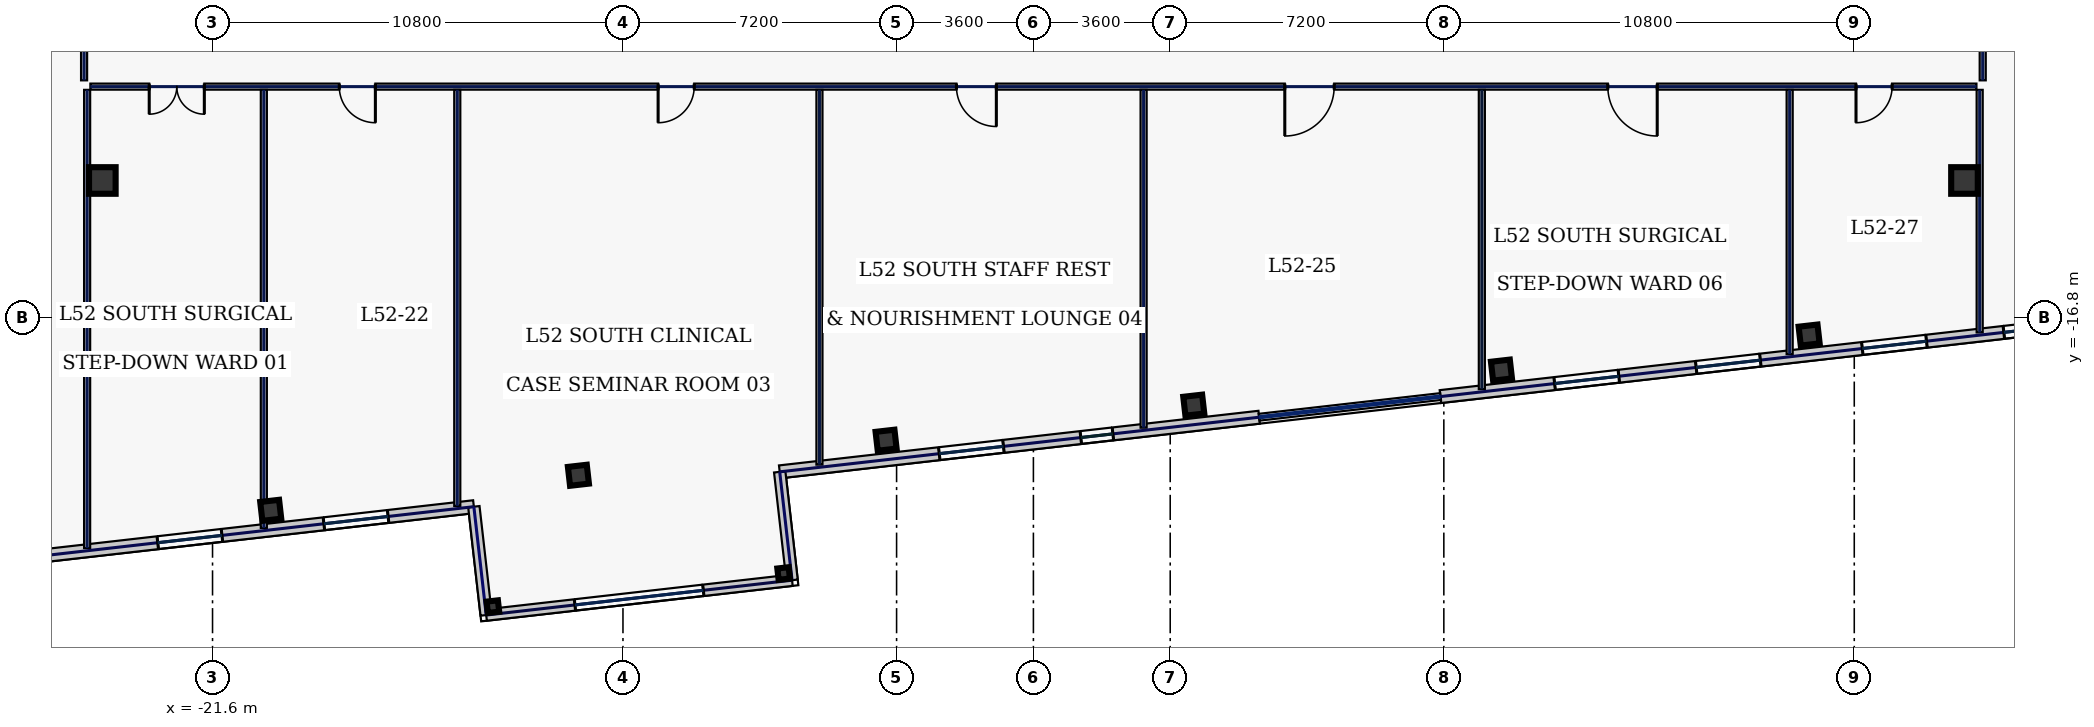
"""IFC4 building model, lengths in metres.
Left out: names, types, materials, properties, quantities, classifications, styles, units other than length and angle.
Written with IfcOpenShell. Run it as: python <this file> out.ifc"""

import sys

from ifc_helpers import new_model, si_unit, direction, frame, frame_2d, origin, origin_2d, place, context, subcontext, project, spatial, rectangle, hollow_rectangle, extrude, element, fill, save


model = new_model("IFC4")
c1 = context("Model", 3, precision=1e-05, world=origin(), true_north=direction((0.0, 1.0)))
c2 = subcontext(c1, "Body", "Model", "MODEL_VIEW")
j1 = project(units=[si_unit("LENGTHUNIT", "METRE"), si_unit("PLANEANGLEUNIT", "RADIAN")], contexts=[c1])
p1 = place(None, origin())
s1 = spatial("IfcSite", under=j1, at=p1, CompositionType="ELEMENT")
p2 = place(p1, origin())
s2 = spatial("IfcBuilding", under=s1, at=p2, CompositionType="ELEMENT")
p3 = place(p2, frame((0.0, 0.0, 226.2)))
s3 = spatial("IfcBuildingStorey", under=s2, at=p3, CompositionType="ELEMENT", Elevation=226.2)
for number, where, z_axis, x_axis in (
    (1, (-24.5, -13.2, 0.0), (0.0, 0.0, 1.0), (1.0, 0.0, 0.0)),
    (2, (24.5, -13.2, 0.0), (0.0, 0.0, 1.0), (1.0, 0.0, 0.0)),
):
    element("IfcColumn", number, at=place(p3, frame(where, z_axis=z_axis, x_axis=x_axis)), inside=s3, PredefinedType="COLUMN", context=c2, shape_type="SweptSolid", body=[
        extrude(hollow_rectangle(XDim=0.7, YDim=0.7, WallThickness=0.032, at=origin_2d()), origin(), (0.0, 0.0, 1.0), 3.74),
    ])
for number, where, z_axis, x_axis in (
    (3, (-20.069, -21.88, 0.0), (0.0, 0.0, 1.0), (0.994, 0.113, 0.0)),
    (4, (-11.972, -20.958, 0.0), (0.0, 0.0, 1.0), (0.994, 0.113, 0.0)),
    (5, (-3.876, -20.035, 0.0), (0.0, 0.0, 1.0), (0.994, 0.113, 0.0)),
    (6, (4.22, -19.113, 0.0), (0.0, 0.0, 1.0), (0.994, 0.113, 0.0)),
    (7, (12.316, -18.19, 0.0), (0.0, 0.0, 1.0), (0.994, 0.113, 0.0)),
    (8, (20.412, -17.268, 0.0), (0.0, 0.0, 1.0), (0.994, 0.113, 0.0)),
):
    element("IfcColumn", number, at=place(p3, frame(where, z_axis=z_axis, x_axis=x_axis)), inside=s3, PredefinedType="COLUMN", context=c2, shape_type="SweptSolid", body=[
        extrude(hollow_rectangle(XDim=0.5, YDim=0.5, WallThickness=0.025, at=origin_2d()), origin(), (0.0, 0.0, 1.0), 3.74),
    ])
for number, where, z_axis, x_axis in (
    (9, (-14.223, -24.415, 0.0), (0.0, 0.0, 1.0), (0.994, 0.113, 0.0)),
    (10, (-6.572, -23.543, 0.0), (0.0, 0.0, 1.0), (0.994, 0.113, 0.0)),
):
    element("IfcColumn", number, at=place(p3, frame(where, z_axis=z_axis, x_axis=x_axis)), inside=s3, PredefinedType="COLUMN", context=c2, shape_type="SweptSolid", body=[
        extrude(hollow_rectangle(XDim=0.3, YDim=0.3, WallThickness=0.016, at=origin_2d()), origin(), (0.0, 0.0, 1.0), 3.74),
    ])
p4 = place(p3, frame((-28.783, -23.386, 0.0), z_axis=(0.0, 0.0, 1.0), x_axis=(0.993572262951, 0.113199639106, 0.0)))
e11 = element("IfcWall", 11, at=p4, inside=s3, PredefinedType="STANDARD", context=c2, shape_type="SweptSolid", body=[
    extrude(rectangle(XDim=14.15, YDim=0.34, at=frame_2d((7.075, 0.0))), origin(), (0.0, 0.0, 1.0), 3.74),
])
p5 = place(p4, frame((2.03, 0.0, 0.88)))
e12 = element("IfcOpeningElement", 12, at=p5, cuts=e11, PredefinedType="OPENING", context=c2, shape_type="SweptSolid", body=[
    extrude(rectangle(XDim=0.85, YDim=1.85, at=frame_2d((0.425, 0.925))), frame((0.0, 0.18, 0.0), z_axis=(0.0, -1.0, 0.0), x_axis=(1.0, 0.0, 0.0)), (0.0, 0.0, 1.0), 0.36),
])
p6 = place(p4, frame((5.779, 0.0, 0.88)))
e13 = element("IfcOpeningElement", 13, at=p6, cuts=e11, PredefinedType="OPENING", context=c2, shape_type="SweptSolid", body=[
    extrude(rectangle(XDim=1.7, YDim=1.95, at=frame_2d((0.85, 0.975))), frame((0.0, 0.18, 0.0), z_axis=(0.0, -1.0, 0.0), x_axis=(1.0, 0.0, 0.0)), (0.0, 0.0, 1.0), 0.36),
])
p7 = place(p4, frame((10.179, 0.0, 0.88)))
e14 = element("IfcOpeningElement", 14, at=p7, cuts=e11, PredefinedType="OPENING", context=c2, shape_type="SweptSolid", body=[
    extrude(rectangle(XDim=1.7, YDim=1.95, at=frame_2d((0.85, 0.975))), frame((0.0, 0.18, 0.0), z_axis=(0.0, -1.0, 0.0), x_axis=(1.0, 0.0, 0.0)), (0.0, 0.0, 1.0), 0.36),
])
p8 = place(p3, frame((-6.676, -20.867, 0.0), z_axis=(0.0, 0.0, 1.0), x_axis=(0.993572024997, 0.113201727649, 0.0)))
e15 = element("IfcWall", 15, at=p8, inside=s3, PredefinedType="STANDARD", context=c2, shape_type="SweptSolid", body=[
    extrude(rectangle(XDim=12.698, YDim=0.34, at=frame_2d((6.349, 0.0))), origin(), (0.0, 0.0, 1.0), 3.74),
])
p9 = place(p8, frame((4.226, 0.0, 0.88)))
e16 = element("IfcOpeningElement", 16, at=p9, cuts=e15, PredefinedType="OPENING", context=c2, shape_type="SweptSolid", body=[
    extrude(rectangle(XDim=1.7, YDim=1.95, at=frame_2d((0.85, 0.975))), frame((0.0, 0.18, 0.0), z_axis=(0.0, -1.0, 0.0), x_axis=(1.0, 0.0, 0.0)), (0.0, 0.0, 1.0), 0.36),
])
p10 = place(p8, frame((7.974, 0.0, 0.88)))
e17 = element("IfcOpeningElement", 17, at=p10, cuts=e15, PredefinedType="OPENING", context=c2, shape_type="SweptSolid", body=[
    extrude(rectangle(XDim=0.85, YDim=1.85, at=frame_2d((0.425, 0.925))), frame((0.0, 0.18, 0.0), z_axis=(0.0, -1.0, 0.0), x_axis=(1.0, 0.0, 0.0)), (0.0, 0.0, 1.0), 0.36),
])
p11 = place(p3, frame((10.71, -18.886, 0.0), z_axis=(0.0, 0.0, 1.0), x_axis=(0.993572271362, 0.113199565282, 0.0)))
e18 = element("IfcWall", 18, at=p11, inside=s3, PredefinedType="STANDARD", context=c2, shape_type="SweptSolid", body=[
    extrude(rectangle(XDim=18.651, YDim=0.34, at=frame_2d((9.326, 0.0))), origin(), (0.0, 0.0, 1.0), 3.74),
])
p12 = place(p11, frame((3.024, 0.0, 0.88)))
e19 = element("IfcOpeningElement", 19, at=p12, cuts=e18, PredefinedType="OPENING", context=c2, shape_type="SweptSolid", body=[
    extrude(rectangle(XDim=1.7, YDim=1.95, at=frame_2d((0.85, 0.975))), frame((0.0, 0.18, 0.0), z_axis=(0.0, -1.0, 0.0), x_axis=(1.0, 0.0, 0.0)), (0.0, 0.0, 1.0), 0.36),
])
p13 = place(p11, frame((6.773, 0.0, 0.88)))
e20 = element("IfcOpeningElement", 20, at=p13, cuts=e18, PredefinedType="OPENING", context=c2, shape_type="SweptSolid", body=[
    extrude(rectangle(XDim=1.7, YDim=1.95, at=frame_2d((0.85, 0.975))), frame((0.0, 0.18, 0.0), z_axis=(0.0, -1.0, 0.0), x_axis=(1.0, 0.0, 0.0)), (0.0, 0.0, 1.0), 0.36),
])
p14 = place(p11, frame((11.173, 0.0, 0.88)))
e21 = element("IfcOpeningElement", 21, at=p14, cuts=e18, PredefinedType="OPENING", context=c2, shape_type="SweptSolid", body=[
    extrude(rectangle(XDim=1.7, YDim=1.95, at=frame_2d((0.85, 0.975))), frame((0.0, 0.18, 0.0), z_axis=(0.0, -1.0, 0.0), x_axis=(1.0, 0.0, 0.0)), (0.0, 0.0, 1.0), 0.36),
])
p15 = place(p11, frame((14.921, 0.0, 0.88)))
e22 = element("IfcOpeningElement", 22, at=p15, cuts=e18, PredefinedType="OPENING", context=c2, shape_type="SweptSolid", body=[
    extrude(rectangle(XDim=1.7, YDim=1.95, at=frame_2d((0.85, 0.975))), frame((0.0, 0.18, 0.0), z_axis=(0.0, -1.0, 0.0), x_axis=(1.0, 0.0, 0.0)), (0.0, 0.0, 1.0), 0.36),
])
p16 = place(p3, frame((-14.724, -21.784, 0.0), z_axis=(0.0, 0.0, 1.0), x_axis=(0.113222704107, -0.993569634839, 0.0)))
e23 = element("IfcWall", 23, at=p16, inside=s3, PredefinedType="STANDARD", context=c2, shape_type="SweptSolid", body=[
    extrude(rectangle(XDim=2.87, YDim=0.3, at=frame_2d((1.435, 0.0))), origin(), (0.0, 0.0, 1.0), 3.74),
])
p17 = place(p3, frame((-6.676, -20.867, 0.0), z_axis=(0.0, 0.0, 1.0), x_axis=(0.113138727493, -0.99357920084, 0.0)))
e24 = element("IfcWall", 24, at=p17, inside=s3, PredefinedType="STANDARD", context=c2, shape_type="SweptSolid", body=[
    extrude(rectangle(XDim=2.87, YDim=0.3, at=frame_2d((1.435, 0.0))), origin(), (0.0, 0.0, 1.0), 3.285),
])
p18 = place(p3, frame((-14.399, -24.636, 0.0), z_axis=(0.0, 0.0, 1.0), x_axis=(0.993571087422, 0.113209956448, 0.0)))
e25 = element("IfcWall", 25, at=p18, inside=s3, PredefinedType="STANDARD", context=c2, shape_type="SweptSolid", body=[
    extrude(rectangle(XDim=8.1, YDim=0.3, at=frame_2d((4.05, 0.0))), origin(), (0.0, 0.0, 1.0), 3.385),
])
p19 = place(p18, frame((2.35, 0.0, 0.68)))
e26 = element("IfcOpeningElement", 26, at=p19, cuts=e25, PredefinedType="OPENING", context=c2, shape_type="SweptSolid", body=[
    extrude(rectangle(XDim=3.4, YDim=2.35, at=frame_2d((1.7, 1.175))), frame((0.0, 0.16, 0.0), z_axis=(0.0, -1.0, 0.0), x_axis=(1.0, 0.0, 0.0)), (0.0, 0.0, 1.0), 0.32),
])
p20 = place(p3, frame((-24.98, -10.565, 0.0), z_axis=(0.0, 0.0, 1.0), x_axis=(0.0, 1.0, 0.0)))
e27 = element("IfcWall", 27, at=p20, inside=s3, PredefinedType="PARTITIONING", context=c2, shape_type="SweptSolid", body=[
    extrude(rectangle(XDim=2.98, YDim=0.16, at=frame_2d((1.49, 0.0))), origin(), (0.0, 0.0, 1.0), 3.74),
])
p21 = place(p20, frame((1.1, 0.0, 0.0)))
e28 = element("IfcOpeningElement", 28, at=p21, cuts=e27, PredefinedType="OPENING", context=c2, shape_type="SweptSolid", body=[
    extrude(rectangle(XDim=0.95, YDim=2.2, at=frame_2d((0.475, 1.1))), frame((0.0, 0.09, 0.0), z_axis=(0.0, -1.0, 0.0), x_axis=(1.0, 0.0, 0.0)), (0.0, 0.0, 1.0), 0.18),
])
p22 = place(p3, frame((24.98, -7.585, 0.0), z_axis=(0.0, 0.0, 1.0), x_axis=(0.0, -1.0, 0.0)))
e29 = element("IfcWall", 29, at=p22, inside=s3, PredefinedType="PARTITIONING", context=c2, shape_type="SweptSolid", body=[
    extrude(rectangle(XDim=2.98, YDim=0.16, at=frame_2d((1.49, 0.0))), origin(), (0.0, 0.0, 1.0), 3.74),
])
p23 = place(p22, frame((1.1, 0.0, 0.0)))
e30 = element("IfcOpeningElement", 30, at=p23, cuts=e29, PredefinedType="OPENING", context=c2, shape_type="SweptSolid", body=[
    extrude(rectangle(XDim=0.95, YDim=2.2, at=frame_2d((0.475, 1.1))), frame((0.0, 0.09, 0.0), z_axis=(0.0, -1.0, 0.0), x_axis=(1.0, 0.0, 0.0)), (0.0, 0.0, 1.0), 0.18),
])
p24 = place(p3, frame((24.815, -10.73, 0.0), z_axis=(0.0, 0.0, 1.0), x_axis=(-1.0, 0.0, 0.0)))
e31 = element("IfcWall", 31, at=p24, inside=s3, PredefinedType="PARTITIONING", context=c2, shape_type="SweptSolid", body=[
    extrude(rectangle(XDim=49.63, YDim=0.16, at=frame_2d((24.815, 0.0))), origin(), (0.0, 0.0, 1.0), 3.74),
])
p25 = place(p24, frame((46.631, 0.0, 0.0)))
e32 = element("IfcOpeningElement", 32, at=p25, cuts=e31, PredefinedType="OPENING", context=c2, shape_type="SweptSolid", body=[
    extrude(rectangle(XDim=1.45, YDim=2.2, at=frame_2d((0.725, 1.1))), frame((0.0, 0.09, 0.0), z_axis=(0.0, -1.0, 0.0), x_axis=(1.0, 0.0, 0.0)), (0.0, 0.0, 1.0), 0.18),
])
p26 = place(p24, frame((42.13, 0.0, 0.0)))
e33 = element("IfcOpeningElement", 33, at=p26, cuts=e31, PredefinedType="OPENING", context=c2, shape_type="SweptSolid", body=[
    extrude(rectangle(XDim=0.95, YDim=2.2, at=frame_2d((0.475, 1.1))), frame((0.0, 0.09, 0.0), z_axis=(0.0, -1.0, 0.0), x_axis=(1.0, 0.0, 0.0)), (0.0, 0.0, 1.0), 0.18),
])
p27 = place(p24, frame((33.74, 0.0, 0.0)))
e34 = element("IfcOpeningElement", 34, at=p27, cuts=e31, PredefinedType="OPENING", context=c2, shape_type="SweptSolid", body=[
    extrude(rectangle(XDim=0.95, YDim=2.2, at=frame_2d((0.475, 1.1))), frame((0.0, 0.09, 0.0), z_axis=(0.0, -1.0, 0.0), x_axis=(1.0, 0.0, 0.0)), (0.0, 0.0, 1.0), 0.18),
])
p28 = place(p24, frame((25.79, 0.0, 0.0)))
e35 = element("IfcOpeningElement", 35, at=p28, cuts=e31, PredefinedType="OPENING", context=c2, shape_type="SweptSolid", body=[
    extrude(rectangle(XDim=1.05, YDim=2.2, at=frame_2d((0.525, 1.1))), frame((0.0, 0.09, 0.0), z_axis=(0.0, -1.0, 0.0), x_axis=(1.0, 0.0, 0.0)), (0.0, 0.0, 1.0), 0.18),
])
p29 = place(p24, frame((16.9, 0.0, 0.0)))
e36 = element("IfcOpeningElement", 36, at=p29, cuts=e31, PredefinedType="OPENING", context=c2, shape_type="SweptSolid", body=[
    extrude(rectangle(XDim=1.3, YDim=2.2, at=frame_2d((0.65, 1.1))), frame((0.0, 0.09, 0.0), z_axis=(0.0, -1.0, 0.0), x_axis=(1.0, 0.0, 0.0)), (0.0, 0.0, 1.0), 0.18),
])
p30 = place(p24, frame((8.4, 0.0, 0.0)))
e37 = element("IfcOpeningElement", 37, at=p30, cuts=e31, PredefinedType="OPENING", context=c2, shape_type="SweptSolid", body=[
    extrude(rectangle(XDim=1.3, YDim=2.2, at=frame_2d((0.65, 1.1))), frame((0.0, 0.09, 0.0), z_axis=(0.0, -1.0, 0.0), x_axis=(1.0, 0.0, 0.0)), (0.0, 0.0, 1.0), 0.18),
])
p31 = place(p24, frame((2.219, 0.0, 0.0)))
e38 = element("IfcOpeningElement", 38, at=p31, cuts=e31, PredefinedType="OPENING", context=c2, shape_type="SweptSolid", body=[
    extrude(rectangle(XDim=0.95, YDim=2.2, at=frame_2d((0.475, 1.1))), frame((0.0, 0.09, 0.0), z_axis=(0.0, -1.0, 0.0), x_axis=(1.0, 0.0, 0.0)), (0.0, 0.0, 1.0), 0.18),
])
p32 = place(p3, frame((-24.9, -22.873, 0.0), z_axis=(0.0, 0.0, 1.0), x_axis=(0.0, 1.0, 0.0)))
e39 = element("IfcWall", 39, at=p32, inside=s3, PredefinedType="PARTITIONING", context=c2, shape_type="SweptSolid", body=[
    extrude(rectangle(XDim=12.058, YDim=0.16, at=frame_2d((6.029, 0.0))), origin(), (0.0, 0.0, 1.0), 3.74),
])
p33 = place(p3, frame((24.9, -17.199, 0.0), z_axis=(0.0, 0.0, 1.0), x_axis=(0.0, 1.0, 0.0)))
e40 = element("IfcWall", 40, at=p33, inside=s3, PredefinedType="PARTITIONING", context=c2, shape_type="SweptSolid", body=[
    extrude(rectangle(XDim=6.385, YDim=0.16, at=frame_2d((3.192, 0.0))), origin(), (0.0, 0.0, 1.0), 3.74),
])
p34 = place(p3, frame((-20.25, -22.344, 0.0), z_axis=(0.0, 0.0, 1.0), x_axis=(0.0, 1.0, 0.0)))
e41 = element("IfcWall", 41, at=p34, inside=s3, PredefinedType="PARTITIONING", context=c2, shape_type="SweptSolid", body=[
    extrude(rectangle(XDim=11.529, YDim=0.16, at=frame_2d((5.764, 0.0))), origin(), (0.0, 0.0, 1.0), 3.74),
])
p35 = place(p3, frame((-15.16, -21.764, 0.0), z_axis=(0.0, 0.0, 1.0), x_axis=(0.0, 1.0, 0.0)))
e42 = element("IfcWall", 42, at=p35, inside=s3, PredefinedType="PARTITIONING", context=c2, shape_type="SweptSolid", body=[
    extrude(rectangle(XDim=10.949, YDim=0.16, at=frame_2d((5.474, 0.0))), origin(), (0.0, 0.0, 1.0), 3.74),
])
p36 = place(p3, frame((-5.63, -20.678, 0.0), z_axis=(0.0, 0.0, 1.0), x_axis=(0.0, 1.0, 0.0)))
e43 = element("IfcWall", 43, at=p36, inside=s3, PredefinedType="PARTITIONING", context=c2, shape_type="SweptSolid", body=[
    extrude(rectangle(XDim=9.863, YDim=0.16, at=frame_2d((4.932, 0.0))), origin(), (0.0, 0.0, 1.0), 3.285),
])
p37 = place(p3, frame((2.9, -19.706, 0.0), z_axis=(0.0, 0.0, 1.0), x_axis=(0.0, 1.0, 0.0)))
e44 = element("IfcWall", 44, at=p37, inside=s3, PredefinedType="PARTITIONING", context=c2, shape_type="SweptSolid", body=[
    extrude(rectangle(XDim=8.891, YDim=0.16, at=frame_2d((4.446, 0.0))), origin(), (0.0, 0.0, 1.0), 3.74),
])
p38 = place(p3, frame((11.8, -18.692, 0.0), z_axis=(0.0, 0.0, 1.0), x_axis=(0.0, 1.0, 0.0)))
e45 = element("IfcWall", 45, at=p38, inside=s3, PredefinedType="PARTITIONING", context=c2, shape_type="SweptSolid", body=[
    extrude(rectangle(XDim=7.877, YDim=0.16, at=frame_2d((3.938, 0.0))), origin(), (0.0, 0.0, 1.0), 2.135),
])
p39 = place(p3, frame((19.9, -17.769, 0.0), z_axis=(0.0, 0.0, 1.0), x_axis=(0.0, 1.0, 0.0)))
e46 = element("IfcWall", 46, at=p39, inside=s3, PredefinedType="PARTITIONING", context=c2, shape_type="SweptSolid", body=[
    extrude(rectangle(XDim=6.954, YDim=0.16, at=frame_2d((3.477, 0.0))), origin(), (0.0, 0.0, 1.0), 3.74),
])
p40 = place(p6, origin())
e47 = element("IfcWindow", 47, at=p40, inside=s3, PartitioningType="SINGLE_PANEL", PredefinedType="WINDOW", context=c2, shape_type="SweptSolid", body=[
    extrude(rectangle(XDim=1.7, YDim=1.95, at=frame_2d((0.85, 0.975))), frame((0.0, 0.03, 0.0), z_axis=(0.0, -1.0, 0.0), x_axis=(1.0, 0.0, 0.0)), (0.0, 0.0, 1.0), 0.06),
])
fill(e13, e47)
p41 = place(p7, origin())
e48 = element("IfcWindow", 48, at=p41, inside=s3, PartitioningType="SINGLE_PANEL", PredefinedType="WINDOW", context=c2, shape_type="SweptSolid", body=[
    extrude(rectangle(XDim=1.7, YDim=1.95, at=frame_2d((0.85, 0.975))), frame((0.0, 0.03, 0.0), z_axis=(0.0, -1.0, 0.0), x_axis=(1.0, 0.0, 0.0)), (0.0, 0.0, 1.0), 0.06),
])
fill(e14, e48)
p42 = place(p9, origin())
e49 = element("IfcWindow", 49, at=p42, inside=s3, PartitioningType="SINGLE_PANEL", PredefinedType="WINDOW", context=c2, shape_type="SweptSolid", body=[
    extrude(rectangle(XDim=1.7, YDim=1.95, at=frame_2d((0.85, 0.975))), frame((0.0, 0.03, 0.0), z_axis=(0.0, -1.0, 0.0), x_axis=(1.0, 0.0, 0.0)), (0.0, 0.0, 1.0), 0.06),
])
fill(e16, e49)
p43 = place(p10, origin())
e50 = element("IfcWindow", 50, at=p43, inside=s3, PartitioningType="SINGLE_PANEL", PredefinedType="WINDOW", context=c2, shape_type="SweptSolid", body=[
    extrude(rectangle(XDim=0.85, YDim=1.85, at=frame_2d((0.425, 0.925))), frame((0.0, 0.03, 0.0), z_axis=(0.0, -1.0, 0.0), x_axis=(1.0, 0.0, 0.0)), (0.0, 0.0, 1.0), 0.06),
])
fill(e17, e50)
p44 = place(p12, origin())
e51 = element("IfcWindow", 51, at=p44, inside=s3, PartitioningType="SINGLE_PANEL", PredefinedType="WINDOW", context=c2, shape_type="SweptSolid", body=[
    extrude(rectangle(XDim=1.7, YDim=1.95, at=frame_2d((0.85, 0.975))), frame((0.0, 0.03, 0.0), z_axis=(0.0, -1.0, 0.0), x_axis=(1.0, 0.0, 0.0)), (0.0, 0.0, 1.0), 0.06),
])
fill(e19, e51)
p45 = place(p13, origin())
e52 = element("IfcWindow", 52, at=p45, inside=s3, PartitioningType="SINGLE_PANEL", PredefinedType="WINDOW", context=c2, shape_type="SweptSolid", body=[
    extrude(rectangle(XDim=1.7, YDim=1.95, at=frame_2d((0.85, 0.975))), frame((0.0, 0.03, 0.0), z_axis=(0.0, -1.0, 0.0), x_axis=(1.0, 0.0, 0.0)), (0.0, 0.0, 1.0), 0.06),
])
fill(e20, e52)
p46 = place(p14, origin())
e53 = element("IfcWindow", 53, at=p46, inside=s3, PartitioningType="SINGLE_PANEL", PredefinedType="WINDOW", context=c2, shape_type="SweptSolid", body=[
    extrude(rectangle(XDim=1.7, YDim=1.95, at=frame_2d((0.85, 0.975))), frame((0.0, 0.03, 0.0), z_axis=(0.0, -1.0, 0.0), x_axis=(1.0, 0.0, 0.0)), (0.0, 0.0, 1.0), 0.06),
])
fill(e21, e53)
p47 = place(p15, origin())
e54 = element("IfcWindow", 54, at=p47, inside=s3, PartitioningType="SINGLE_PANEL", PredefinedType="WINDOW", context=c2, shape_type="SweptSolid", body=[
    extrude(rectangle(XDim=1.7, YDim=1.95, at=frame_2d((0.85, 0.975))), frame((0.0, 0.03, 0.0), z_axis=(0.0, -1.0, 0.0), x_axis=(1.0, 0.0, 0.0)), (0.0, 0.0, 1.0), 0.06),
])
fill(e22, e54)
p48 = place(p19, origin())
e55 = element("IfcWindow", 55, at=p48, inside=s3, PartitioningType="SINGLE_PANEL", PredefinedType="WINDOW", context=c2, shape_type="SweptSolid", body=[
    extrude(rectangle(XDim=3.4, YDim=2.35, at=frame_2d((1.7, 1.175))), frame((0.0, 0.03, 0.0), z_axis=(0.0, -1.0, 0.0), x_axis=(1.0, 0.0, 0.0)), (0.0, 0.0, 1.0), 0.06),
])
fill(e26, e55)
p49 = place(p25, origin())
e56 = element("IfcDoor", 56, at=p49, inside=s3, OperationType="DOUBLE_SWING_LEFT", PredefinedType="DOOR", context=c2, shape_type="SweptSolid", body=[
    extrude(rectangle(XDim=1.45, YDim=2.2, at=frame_2d((0.725, 1.1))), frame((0.0, 0.025, 0.0), z_axis=(0.0, -1.0, 0.0), x_axis=(1.0, 0.0, 0.0)), (0.0, 0.0, 1.0), 0.05),
])
fill(e32, e56)
p50 = place(p26, origin())
e57 = element("IfcDoor", 57, at=p50, inside=s3, OperationType="SINGLE_SWING_LEFT", PredefinedType="DOOR", context=c2, shape_type="SweptSolid", body=[
    extrude(rectangle(XDim=0.95, YDim=2.2, at=frame_2d((0.475, 1.1))), frame((0.0, 0.025, 0.0), z_axis=(0.0, -1.0, 0.0), x_axis=(1.0, 0.0, 0.0)), (0.0, 0.0, 1.0), 0.05),
])
fill(e33, e57)
p51 = place(p27, origin())
e58 = element("IfcDoor", 58, at=p51, inside=s3, OperationType="SINGLE_SWING_RIGHT", PredefinedType="DOOR", context=c2, shape_type="SweptSolid", body=[
    extrude(rectangle(XDim=0.95, YDim=2.2, at=frame_2d((0.475, 1.1))), frame((0.0, 0.025, 0.0), z_axis=(0.0, -1.0, 0.0), x_axis=(1.0, 0.0, 0.0)), (0.0, 0.0, 1.0), 0.05),
])
fill(e34, e58)
p52 = place(p28, origin())
e59 = element("IfcDoor", 59, at=p52, inside=s3, OperationType="SINGLE_SWING_LEFT", PredefinedType="DOOR", context=c2, shape_type="SweptSolid", body=[
    extrude(rectangle(XDim=1.05, YDim=2.2, at=frame_2d((0.525, 1.1))), frame((0.0, 0.025, 0.0), z_axis=(0.0, -1.0, 0.0), x_axis=(1.0, 0.0, 0.0)), (0.0, 0.0, 1.0), 0.05),
])
fill(e35, e59)
p53 = place(p29, origin())
e60 = element("IfcDoor", 60, at=p53, inside=s3, OperationType="SINGLE_SWING_RIGHT", PredefinedType="DOOR", context=c2, shape_type="SweptSolid", body=[
    extrude(rectangle(XDim=1.3, YDim=2.2, at=frame_2d((0.65, 1.1))), frame((0.0, 0.025, 0.0), z_axis=(0.0, -1.0, 0.0), x_axis=(1.0, 0.0, 0.0)), (0.0, 0.0, 1.0), 0.05),
])
fill(e36, e60)
p54 = place(p30, origin())
e61 = element("IfcDoor", 61, at=p54, inside=s3, OperationType="SINGLE_SWING_LEFT", PredefinedType="DOOR", context=c2, shape_type="SweptSolid", body=[
    extrude(rectangle(XDim=1.3, YDim=2.2, at=frame_2d((0.65, 1.1))), frame((0.0, 0.025, 0.0), z_axis=(0.0, -1.0, 0.0), x_axis=(1.0, 0.0, 0.0)), (0.0, 0.0, 1.0), 0.05),
])
fill(e37, e61)
p55 = place(p31, origin())
e62 = element("IfcDoor", 62, at=p55, inside=s3, OperationType="SINGLE_SWING_RIGHT", PredefinedType="DOOR", context=c2, shape_type="SweptSolid", body=[
    extrude(rectangle(XDim=0.95, YDim=2.2, at=frame_2d((0.475, 1.1))), frame((0.0, 0.025, 0.0), z_axis=(0.0, -1.0, 0.0), x_axis=(1.0, 0.0, 0.0)), (0.0, 0.0, 1.0), 0.05),
])
fill(e38, e62)
save(model, sys.argv[1])
